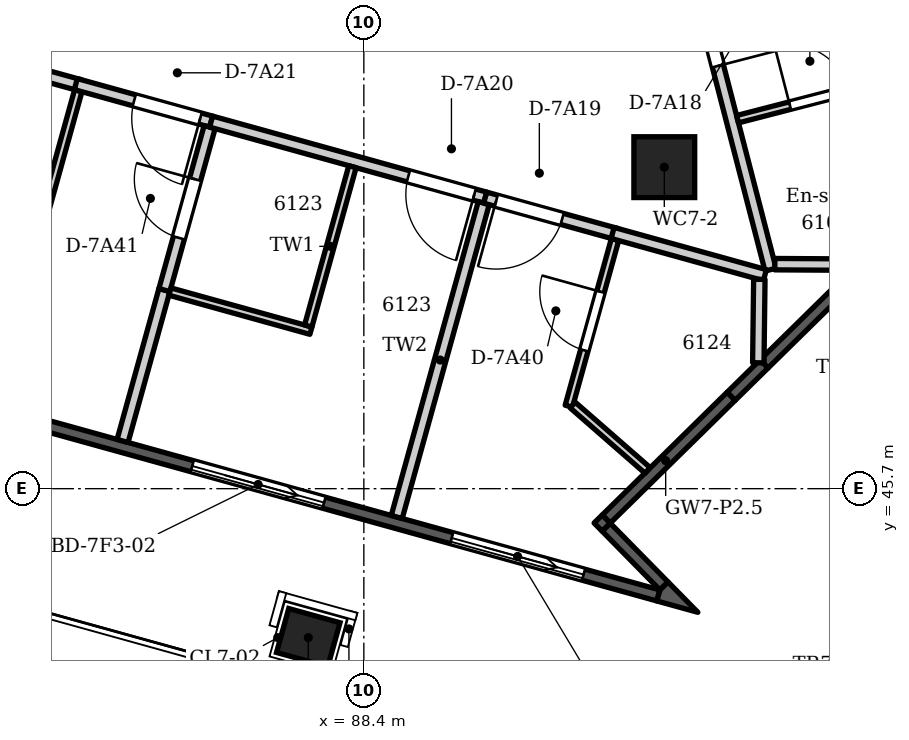
"""IFC4 building model, lengths in metres.
Left out: names, types, materials, properties, quantities, classifications, styles, units other than length and angle.
Written with IfcOpenShell. Run it as: python <this file> out.ifc"""

import sys

from ifc_helpers import new_model, si_unit, direction, frame, frame_2d, origin, origin_2d, place, context, subcontext, project, spatial, polyline, rectangle, circle, outline, extrude, element, fill, save


model = new_model("IFC4")
c1 = context("Model", 3, precision=1e-05, world=origin(), true_north=direction((0.0, 1.0)))
c2 = subcontext(c1, "Body", "Model", "MODEL_VIEW")
j1 = project(units=[si_unit("LENGTHUNIT", "METRE"), si_unit("PLANEANGLEUNIT", "RADIAN")], contexts=[c1])
p1 = place(None, origin())
s1 = spatial("IfcSite", under=j1, at=p1, CompositionType="ELEMENT")
p2 = place(p1, origin())
s2 = spatial("IfcBuilding", under=s1, at=p2, CompositionType="ELEMENT")
p3 = place(p2, frame((0.0, 0.0, 234.9)))
s3 = spatial("IfcBuildingStorey", under=s2, at=p3, CompositionType="ELEMENT", Elevation=234.9)
p4 = place(p3, frame((87.669, 43.741, -0.35), z_axis=(0.0, 0.0, 1.0), x_axis=(-0.963630453209, 0.267238376078, 0.0)))
e1 = element("IfcColumn", 1, at=p4, inside=s3, PredefinedType="COLUMN", context=c2, shape_type="SweptSolid", body=[
    extrude(rectangle(XDim=0.7, YDim=0.6, at=origin_2d()), origin(), (0.0, 0.0, 1.0), 3.95),
])
p5 = place(p3, frame((92.353, 49.93, -0.35), z_axis=(0.0, 0.0, 1.0), x_axis=(1.0, 0.0, 0.0)))
e2 = element("IfcColumn", 2, at=p5, inside=s3, PredefinedType="COLUMN", context=c2, shape_type="SweptSolid", body=[
    extrude(circle(Radius=0.4, at=origin_2d()), origin(), (0.0, 0.0, 1.0), 3.95),
])
p6 = place(p3, frame((89.591, 82.378, 0.0), z_axis=(0.0, 0.0, 1.0), x_axis=(0.250378839788, -0.968147941477, 0.0)))
e3 = element("IfcWall", 3, at=p6, inside=s3, PredefinedType="SOLIDWALL", context=c2, shape_type="SweptSolid", body=[
    extrude(outline(polyline([(0.149, 0.075), (0.149, -0.075), (33.537, -0.075), (33.537, 0.075), (0.149, 0.075)])), origin(), (0.0, 0.0, 1.0), 3.3),
])
p7 = place(p6, frame((1.171, 0.0, 0.0)))
e4 = element("IfcOpeningElement", 4, at=p7, cuts=e3, PredefinedType="OPENING", context=c2, shape_type="SweptSolid", body=[
    extrude(rectangle(XDim=1.8, YDim=2.6, at=frame_2d((0.9, 1.3))), frame((0.0, 0.085, 0.0), z_axis=(0.0, -1.0, 0.0), x_axis=(1.0, 0.0, 0.0)), (0.0, 0.0, 1.0), 0.17),
])
p8 = place(p6, frame((4.714, 0.0, 0.0)))
e5 = element("IfcOpeningElement", 5, at=p8, cuts=e3, PredefinedType="OPENING", context=c2, shape_type="SweptSolid", body=[
    extrude(rectangle(XDim=1.8, YDim=2.6, at=frame_2d((0.9, 1.3))), frame((0.0, 0.085, 0.0), z_axis=(0.0, -1.0, 0.0), x_axis=(1.0, 0.0, 0.0)), (0.0, 0.0, 1.0), 0.17),
])
p9 = place(p6, frame((8.457, 0.0, 0.0)))
e6 = element("IfcOpeningElement", 6, at=p9, cuts=e3, PredefinedType="OPENING", context=c2, shape_type="SweptSolid", body=[
    extrude(rectangle(XDim=1.8, YDim=2.6, at=frame_2d((0.9, 1.3))), frame((0.0, 0.085, 0.0), z_axis=(0.0, -1.0, 0.0), x_axis=(1.0, 0.0, 0.0)), (0.0, 0.0, 1.0), 0.17),
])
p10 = place(p6, frame((12.2, 0.0, 0.0)))
e7 = element("IfcOpeningElement", 7, at=p10, cuts=e3, PredefinedType="OPENING", context=c2, shape_type="SweptSolid", body=[
    extrude(rectangle(XDim=1.8, YDim=2.6, at=frame_2d((0.9, 1.3))), frame((0.0, 0.085, 0.0), z_axis=(0.0, -1.0, 0.0), x_axis=(1.0, 0.0, 0.0)), (0.0, 0.0, 1.0), 0.17),
])
p11 = place(p6, frame((15.943, 0.0, 0.0)))
e8 = element("IfcOpeningElement", 8, at=p11, cuts=e3, PredefinedType="OPENING", context=c2, shape_type="SweptSolid", body=[
    extrude(rectangle(XDim=1.8, YDim=2.6, at=frame_2d((0.9, 1.3))), frame((0.0, 0.085, 0.0), z_axis=(0.0, -1.0, 0.0), x_axis=(1.0, 0.0, 0.0)), (0.0, 0.0, 1.0), 0.17),
])
p12 = place(p6, frame((19.686, 0.0, 0.0)))
e9 = element("IfcOpeningElement", 9, at=p12, cuts=e3, PredefinedType="OPENING", context=c2, shape_type="SweptSolid", body=[
    extrude(rectangle(XDim=1.8, YDim=2.6, at=frame_2d((0.9, 1.3))), frame((0.0, 0.085, 0.0), z_axis=(0.0, -1.0, 0.0), x_axis=(1.0, 0.0, 0.0)), (0.0, 0.0, 1.0), 0.17),
])
p13 = place(p6, frame((23.429, 0.0, 0.0)))
e10 = element("IfcOpeningElement", 10, at=p13, cuts=e3, PredefinedType="OPENING", context=c2, shape_type="SweptSolid", body=[
    extrude(rectangle(XDim=1.8, YDim=2.6, at=frame_2d((0.9, 1.3))), frame((0.0, 0.085, 0.0), z_axis=(0.0, -1.0, 0.0), x_axis=(1.0, 0.0, 0.0)), (0.0, 0.0, 1.0), 0.17),
])
p14 = place(p6, frame((27.172, 0.0, 0.0)))
e11 = element("IfcOpeningElement", 11, at=p14, cuts=e3, PredefinedType="OPENING", context=c2, shape_type="SweptSolid", body=[
    extrude(rectangle(XDim=1.8, YDim=2.6, at=frame_2d((0.9, 1.3))), frame((0.0, 0.085, 0.0), z_axis=(0.0, -1.0, 0.0), x_axis=(1.0, 0.0, 0.0)), (0.0, 0.0, 1.0), 0.17),
])
p15 = place(p6, frame((30.715, 0.0, 0.0)))
e12 = element("IfcOpeningElement", 12, at=p15, cuts=e3, PredefinedType="OPENING", context=c2, shape_type="SweptSolid", body=[
    extrude(rectangle(XDim=1.8, YDim=2.6, at=frame_2d((0.9, 1.3))), frame((0.0, 0.085, 0.0), z_axis=(0.0, -1.0, 0.0), x_axis=(1.0, 0.0, 0.0)), (0.0, 0.0, 1.0), 0.17),
])
p16 = place(p3, frame((94.918, 48.573, 0.0), z_axis=(0.0, 0.0, 1.0), x_axis=(-0.713193839807, -0.700966865737, 0.0)))
e13 = element("IfcWall", 13, at=p16, inside=s3, PredefinedType="SOLIDWALL", context=c2, shape_type="SweptSolid", body=[
    extrude(outline(polyline([(0.0, -0.075), (1.757, -0.075), (1.757, 0.075), (0.0, 0.075), (0.0, -0.075)])), origin(), (0.0, 0.0, 1.0), 3.3),
])
p17 = place(p3, frame((93.665, 47.341, 0.0), z_axis=(0.0, 0.0, 1.0), x_axis=(-0.713304727682, -0.700854025791, 0.0)))
e14 = element("IfcWall", 14, at=p17, inside=s3, PredefinedType="SOLIDWALL", context=c2, shape_type="SweptSolid", body=[
    extrude(outline(polyline([(0.0, -0.075), (0.608, -0.075), (0.608, 0.075), (0.0, 0.075), (0.0, -0.075)])), origin(), (0.0, 0.0, 1.0), 2.75),
])
p18 = place(p3, frame((93.232, 46.915, 0.0), z_axis=(0.0, 0.0, 1.0), x_axis=(-0.713249493487, -0.700910236793, 0.0)))
e15 = element("IfcWall", 15, at=p18, inside=s3, PredefinedType="SOLIDWALL", context=c2, shape_type="SweptSolid", body=[
    extrude(outline(polyline([(2.304, 0.075), (0.0, 0.075), (0.0, -0.075), (2.304, -0.075), (2.304, 0.075)])), origin(), (0.0, 0.0, 1.0), 3.3),
])
p19 = place(p3, frame((91.51, 45.272, 0.0), z_axis=(0.0, 0.0, 1.0), x_axis=(0.700999978355, -0.71316129336, 0.0)))
e16 = element("IfcWall", 16, at=p19, inside=s3, PredefinedType="SOLIDWALL", context=c2, shape_type="SweptSolid", body=[
    extrude(outline(polyline([(0.11, 0.075), (0.11, -0.075), (1.196, -0.075), (1.196, 0.075), (0.11, 0.075)])), origin(), (0.0, 0.0, 1.0), 3.3),
])
p20 = place(p3, frame((92.419, 44.255, 0.0), z_axis=(0.0, 0.0, 1.0), x_axis=(-0.963630586427, 0.267237895708, 0.0)))
e17 = element("IfcWall", 17, at=p20, inside=s3, PredefinedType="SOLIDWALL", context=c2, shape_type="SweptSolid", body=[
    extrude(outline(polyline([(0.149, 0.075), (0.149, -0.075), (33.537, -0.075), (33.537, 0.075), (0.149, 0.075)])), origin(), (0.0, 0.0, 1.0), 3.3),
])
p21 = place(p20, frame((1.171, 0.0, 0.0)))
e18 = element("IfcOpeningElement", 18, at=p21, cuts=e17, PredefinedType="OPENING", context=c2, shape_type="SweptSolid", body=[
    extrude(rectangle(XDim=1.8, YDim=2.6, at=frame_2d((0.9, 1.3))), frame((0.0, 0.085, 0.0), z_axis=(0.0, -1.0, 0.0), x_axis=(1.0, 0.0, 0.0)), (0.0, 0.0, 1.0), 0.17),
])
p22 = place(p20, frame((4.714, 0.0, 0.0)))
e19 = element("IfcOpeningElement", 19, at=p22, cuts=e17, PredefinedType="OPENING", context=c2, shape_type="SweptSolid", body=[
    extrude(rectangle(XDim=1.8, YDim=2.6, at=frame_2d((0.9, 1.3))), frame((0.0, 0.085, 0.0), z_axis=(0.0, -1.0, 0.0), x_axis=(1.0, 0.0, 0.0)), (0.0, 0.0, 1.0), 0.17),
])
p23 = place(p20, frame((8.457, 0.0, 0.0)))
e20 = element("IfcOpeningElement", 20, at=p23, cuts=e17, PredefinedType="OPENING", context=c2, shape_type="SweptSolid", body=[
    extrude(rectangle(XDim=1.8, YDim=2.6, at=frame_2d((0.9, 1.3))), frame((0.0, 0.085, 0.0), z_axis=(0.0, -1.0, 0.0), x_axis=(1.0, 0.0, 0.0)), (0.0, 0.0, 1.0), 0.17),
])
p24 = place(p20, frame((12.2, 0.0, 0.0)))
e21 = element("IfcOpeningElement", 21, at=p24, cuts=e17, PredefinedType="OPENING", context=c2, shape_type="SweptSolid", body=[
    extrude(rectangle(XDim=1.8, YDim=2.6, at=frame_2d((0.9, 1.3))), frame((0.0, 0.085, 0.0), z_axis=(0.0, -1.0, 0.0), x_axis=(1.0, 0.0, 0.0)), (0.0, 0.0, 1.0), 0.17),
])
p25 = place(p20, frame((15.943, 0.0, 0.0)))
e22 = element("IfcOpeningElement", 22, at=p25, cuts=e17, PredefinedType="OPENING", context=c2, shape_type="SweptSolid", body=[
    extrude(rectangle(XDim=1.8, YDim=2.6, at=frame_2d((0.9, 1.3))), frame((0.0, 0.085, 0.0), z_axis=(0.0, -1.0, 0.0), x_axis=(1.0, 0.0, 0.0)), (0.0, 0.0, 1.0), 0.17),
])
p26 = place(p20, frame((19.686, 0.0, 0.0)))
e23 = element("IfcOpeningElement", 23, at=p26, cuts=e17, PredefinedType="OPENING", context=c2, shape_type="SweptSolid", body=[
    extrude(rectangle(XDim=1.8, YDim=2.6, at=frame_2d((0.9, 1.3))), frame((0.0, 0.085, 0.0), z_axis=(0.0, -1.0, 0.0), x_axis=(1.0, 0.0, 0.0)), (0.0, 0.0, 1.0), 0.17),
])
p27 = place(p20, frame((23.429, 0.0, 0.0)))
e24 = element("IfcOpeningElement", 24, at=p27, cuts=e17, PredefinedType="OPENING", context=c2, shape_type="SweptSolid", body=[
    extrude(rectangle(XDim=1.8, YDim=2.6, at=frame_2d((0.9, 1.3))), frame((0.0, 0.085, 0.0), z_axis=(0.0, -1.0, 0.0), x_axis=(1.0, 0.0, 0.0)), (0.0, 0.0, 1.0), 0.17),
])
p28 = place(p20, frame((27.172, 0.0, 0.0)))
e25 = element("IfcOpeningElement", 25, at=p28, cuts=e17, PredefinedType="OPENING", context=c2, shape_type="SweptSolid", body=[
    extrude(rectangle(XDim=1.8, YDim=2.6, at=frame_2d((0.9, 1.3))), frame((0.0, 0.085, 0.0), z_axis=(0.0, -1.0, 0.0), x_axis=(1.0, 0.0, 0.0)), (0.0, 0.0, 1.0), 0.17),
])
p29 = place(p20, frame((30.715, 0.0, 0.0)))
e26 = element("IfcOpeningElement", 26, at=p29, cuts=e17, PredefinedType="OPENING", context=c2, shape_type="SweptSolid", body=[
    extrude(rectangle(XDim=1.8, YDim=2.6, at=frame_2d((0.9, 1.3))), frame((0.0, 0.085, 0.0), z_axis=(0.0, -1.0, 0.0), x_axis=(1.0, 0.0, 0.0)), (0.0, 0.0, 1.0), 0.17),
])
p30 = place(p3, origin())
e27 = element("IfcWall", 27, at=p30, inside=s3, PredefinedType="PARAPET", context=c2, shape_type="SweptSolid", body=[
    extrude(outline(polyline([(59.388, 50.961), (96.326, 36.411), (96.275, 36.753), (62.154, 50.194), (59.388, 50.961)])), origin(), (0.0, 0.0, 1.0), 1.1),
])
p31 = place(p3, origin())
e28 = element("IfcWall", 28, at=p31, inside=s3, PredefinedType="PARAPET", context=c2, shape_type="SweptSolid", body=[
    extrude(outline(polyline([(100.299, 50.419), (94.431, 89.683), (94.16, 89.468), (99.581, 53.198), (100.299, 50.419)])), origin(), (0.0, 0.0, 1.0), 1.1),
])
p32 = place(p3, frame((82.852, 51.508, 0.0), z_axis=(0.0, 0.0, 1.0), x_axis=(0.963942160186, -0.266111840805, 0.0)))
e29 = element("IfcWall", 29, at=p32, inside=s3, PredefinedType="PARTITIONING", context=c2, shape_type="SweptSolid", body=[
    extrude(rectangle(XDim=1.883, YDim=0.15, at=frame_2d((0.941, 0.0))), origin(), (0.0, 0.0, 1.0), 3.3),
])
p33 = place(p3, frame((83.507, 51.396, 0.0), z_axis=(0.0, 0.0, 1.0), x_axis=(0.712824796749, 0.701342148412, 0.0)))
e30 = element("IfcWall", 30, at=p33, inside=s3, PredefinedType="PARTITIONING", context=c2, shape_type="SweptSolid", body=[
    extrude(rectangle(XDim=2.169, YDim=0.15, at=frame_2d((1.084, 0.0))), origin(), (0.0, 0.0, 1.0), 3.3),
])
p34 = place(p3, frame((84.061, 48.84, 0.0), z_axis=(0.0, 0.0, 1.0), x_axis=(0.26738911175, 0.96358863781, 0.0)))
e31 = element("IfcWall", 31, at=p34, inside=s3, PredefinedType="PARTITIONING", context=c2, shape_type="SweptSolid", body=[
    extrude(rectangle(XDim=2.175, YDim=0.1, at=frame_2d((1.087, 0.0))), origin(), (0.0, 0.0, 1.0), 3.3),
])
p35 = place(p3, frame((84.611, 51.022, 0.0), z_axis=(0.0, 0.0, 1.0), x_axis=(0.963673001046, -0.267084906077, 0.0)))
e32 = element("IfcWall", 32, at=p35, inside=s3, PredefinedType="PARTITIONING", context=c2, shape_type="SweptSolid", body=[
    extrude(rectangle(XDim=1.847, YDim=0.15, at=frame_2d((0.924, 0.0))), origin(), (0.0, 0.0, 1.0), 3.3),
])
p36 = place(p35, frame((0.797, 0.0, 0.0)))
e33 = element("IfcOpeningElement", 33, at=p36, cuts=e32, PredefinedType="OPENING", context=c2, shape_type="SweptSolid", body=[
    extrude(rectangle(XDim=0.9, YDim=2.1, at=frame_2d((0.45, 1.05))), frame((0.0, 0.085, 0.0), z_axis=(0.0, -1.0, 0.0), x_axis=(1.0, 0.0, 0.0)), (0.0, 0.0, 1.0), 0.17),
])
p37 = place(p3, frame((85.226, 46.327, 0.0), z_axis=(0.0, 0.0, 1.0), x_axis=(0.267075474737, 0.963675614921, 0.0)))
e34 = element("IfcWall", 34, at=p37, inside=s3, PredefinedType="PARTITIONING", context=c2, shape_type="SweptSolid", body=[
    extrude(rectangle(XDim=2.061, YDim=0.15, at=frame_2d((1.03, 0.0))), origin(), (0.0, 0.0, 1.0), 3.3),
])
p38 = place(p3, frame((85.776, 48.313, 0.0), z_axis=(0.0, 0.0, 1.0), x_axis=(0.267423129935, 0.963579197355, 0.0)))
e35 = element("IfcWall", 35, at=p38, inside=s3, PredefinedType="PARTITIONING", context=c2, shape_type="SweptSolid", body=[
    extrude(rectangle(XDim=2.225, YDim=0.15, at=frame_2d((1.112, 0.0))), origin(), (0.0, 0.0, 1.0), 3.3),
])
p39 = place(p38, frame((0.712, 0.0, 0.0)))
e36 = element("IfcOpeningElement", 36, at=p39, cuts=e35, PredefinedType="OPENING", context=c2, shape_type="SweptSolid", body=[
    extrude(rectangle(XDim=0.8, YDim=2.1, at=frame_2d((0.4, 1.05))), frame((0.0, 0.085, 0.0), z_axis=(0.0, -1.0, 0.0), x_axis=(1.0, 0.0, 0.0)), (0.0, 0.0, 1.0), 0.17),
])
p40 = place(p3, frame((85.848, 48.293, 0.0), z_axis=(0.0, 0.0, 1.0), x_axis=(0.963625049046, -0.267257862095, 0.0)))
e37 = element("IfcWall", 37, at=p40, inside=s3, PredefinedType="PARTITIONING", context=c2, shape_type="SweptSolid", body=[
    extrude(rectangle(XDim=1.925, YDim=0.1, at=frame_2d((0.962, 0.0))), origin(), (0.0, 0.0, 1.0), 3.3),
])
p41 = place(p3, frame((86.391, 50.529, 0.0), z_axis=(0.0, 0.0, 1.0), x_axis=(0.963631856359, -0.267233316428, 0.0)))
e38 = element("IfcWall", 38, at=p41, inside=s3, PredefinedType="PARTITIONING", context=c2, shape_type="SweptSolid", body=[
    extrude(rectangle(XDim=3.742, YDim=0.15, at=frame_2d((1.871, 0.0))), origin(), (0.0, 0.0, 1.0), 3.3),
])
p42 = place(p41, frame((2.692, 0.0, 0.0)))
e39 = element("IfcOpeningElement", 39, at=p42, cuts=e38, PredefinedType="OPENING", context=c2, shape_type="SweptSolid", body=[
    extrude(rectangle(XDim=0.9, YDim=2.1, at=frame_2d((0.45, 1.05))), frame((0.0, 0.085, 0.0), z_axis=(0.0, -1.0, 0.0), x_axis=(1.0, 0.0, 0.0)), (0.0, 0.0, 1.0), 0.17),
])
p43 = place(p3, frame((87.668, 47.84, 0.0), z_axis=(0.0, 0.0, 1.0), x_axis=(0.26738911175, 0.96358863781, 0.0)))
e40 = element("IfcWall", 40, at=p43, inside=s3, PredefinedType="PARTITIONING", context=c2, shape_type="SweptSolid", body=[
    extrude(rectangle(XDim=2.175, YDim=0.1, at=frame_2d((1.087, 0.0))), origin(), (0.0, 0.0, 1.0), 3.3),
])
p44 = place(p3, frame((88.833, 45.327, 0.0), z_axis=(0.0, 0.0, 1.0), x_axis=(0.267044344438, 0.963684241909, 0.0)))
e41 = element("IfcWall", 41, at=p44, inside=s3, PredefinedType="PARTITIONING", context=c2, shape_type="SweptSolid", body=[
    extrude(rectangle(XDim=4.285, YDim=0.15, at=frame_2d((2.143, 0.0))), origin(), (0.0, 0.0, 1.0), 3.3),
])
p45 = place(p3, frame((89.997, 49.529, 0.0), z_axis=(0.0, 0.0, 1.0), x_axis=(0.963677325853, -0.267069301188, 0.0)))
e42 = element("IfcWall", 42, at=p45, inside=s3, PredefinedType="PARTITIONING", context=c2, shape_type="SweptSolid", body=[
    extrude(rectangle(XDim=1.797, YDim=0.15, at=frame_2d((0.898, 0.0))), origin(), (0.0, 0.0, 1.0), 3.3),
])
p46 = place(p45, frame((0.15, 0.0, 0.0)))
e43 = element("IfcOpeningElement", 43, at=p46, cuts=e42, PredefinedType="OPENING", context=c2, shape_type="SweptSolid", body=[
    extrude(rectangle(XDim=0.9, YDim=2.1, at=frame_2d((0.45, 1.05))), frame((0.0, 0.085, 0.0), z_axis=(0.0, -1.0, 0.0), x_axis=(1.0, 0.0, 0.0)), (0.0, 0.0, 1.0), 0.17),
])
p47 = place(p3, frame((91.097, 46.785, 0.0), z_axis=(0.0, 0.0, 1.0), x_axis=(0.267345061669, 0.963600860316, 0.0)))
e44 = element("IfcWall", 44, at=p47, inside=s3, PredefinedType="PARTITIONING", context=c2, shape_type="SweptSolid", body=[
    extrude(rectangle(XDim=2.276, YDim=0.1, at=frame_2d((1.138, 0.0))), origin(), (0.0, 0.0, 1.0), 3.3),
])
p48 = place(p47, frame((0.763, 0.0, 0.0)))
e45 = element("IfcOpeningElement", 45, at=p48, cuts=e44, PredefinedType="OPENING", context=c2, shape_type="SweptSolid", body=[
    extrude(rectangle(XDim=0.8, YDim=2.1, at=frame_2d((0.4, 1.05))), frame((0.0, 0.06, 0.0), z_axis=(0.0, -1.0, 0.0), x_axis=(1.0, 0.0, 0.0)), (0.0, 0.0, 1.0), 0.12),
])
p49 = place(p3, frame((91.148, 46.8, 0.0), z_axis=(0.0, 0.0, 1.0), x_axis=(0.753374202667, -0.657592054967, 0.0)))
e46 = element("IfcWall", 46, at=p49, inside=s3, PredefinedType="PARTITIONING", context=c2, shape_type="SweptSolid", body=[
    extrude(rectangle(XDim=1.308, YDim=0.1, at=frame_2d((0.654, 0.0))), origin(), (0.0, 0.0, 1.0), 3.3),
])
p50 = place(p3, frame((91.355, 57.841, 0.0), z_axis=(0.0, 0.0, 1.0), x_axis=(0.25042530879, -0.968135922646, 0.0)))
e47 = element("IfcWall", 47, at=p50, inside=s3, PredefinedType="PARTITIONING", context=c2, shape_type="SweptSolid", body=[
    extrude(rectangle(XDim=9.565, YDim=0.15, at=frame_2d((4.782, 0.0))), origin(), (0.0, 0.0, 1.0), 2.75),
])
p51 = place(p50, frame((4.697, 0.0, 0.0)))
e48 = element("IfcOpeningElement", 48, at=p51, cuts=e47, PredefinedType="OPENING", context=c2, shape_type="SweptSolid", body=[
    extrude(rectangle(XDim=0.9, YDim=2.1, at=frame_2d((0.45, 1.05))), frame((0.0, 0.085, 0.0), z_axis=(0.0, -1.0, 0.0), x_axis=(1.0, 0.0, 0.0)), (0.0, 0.0, 1.0), 0.17),
])
p52 = place(p50, frame((5.897, 0.0, 0.0)))
e49 = element("IfcOpeningElement", 49, at=p52, cuts=e47, PredefinedType="OPENING", context=c2, shape_type="SweptSolid", body=[
    extrude(rectangle(XDim=0.9, YDim=2.1, at=frame_2d((0.45, 1.05))), frame((0.0, 0.085, 0.0), z_axis=(0.0, -1.0, 0.0), x_axis=(1.0, 0.0, 0.0)), (0.0, 0.0, 1.0), 0.17),
])
p53 = place(p3, frame((91.673, 49.064, 0.0), z_axis=(0.0, 0.0, 1.0), x_axis=(0.963652381101, -0.267159294054, 0.0)))
e50 = element("IfcWall", 50, at=p53, inside=s3, PredefinedType="PARTITIONING", context=c2, shape_type="SweptSolid", body=[
    extrude(rectangle(XDim=2.079, YDim=0.15, at=frame_2d((1.04, 0.0))), origin(), (0.0, 0.0, 1.0), 2.75),
])
p54 = place(p3, frame((93.317, 50.561, 0.0), z_axis=(0.0, 0.0, 1.0), x_axis=(0.968101130966, 0.25055977375, 0.0)))
e51 = element("IfcWall", 51, at=p54, inside=s3, PredefinedType="PARTITIONING", context=c2, shape_type="SweptSolid", body=[
    extrude(rectangle(XDim=2.274, YDim=0.1, at=frame_2d((1.137, 0.0))), origin(), (0.0, 0.0, 1.0), 3.3),
])
p55 = place(p54, frame((0.712, 0.0, 0.0)))
e52 = element("IfcOpeningElement", 52, at=p55, cuts=e51, PredefinedType="OPENING", context=c2, shape_type="SweptSolid", body=[
    extrude(rectangle(XDim=0.8, YDim=2.1, at=frame_2d((0.4, 1.05))), frame((0.0, 0.06, 0.0), z_axis=(0.0, -1.0, 0.0), x_axis=(1.0, 0.0, 0.0)), (0.0, 0.0, 1.0), 0.12),
])
for number, where, z_axis, x_axis in (
    (53, (93.59, 47.356, 0.0), (0.0, 0.0, 1.0), (0.012, 1.0, 0.0)),
    (54, (93.807, 48.654, 0.0), (0.0, 0.0, 1.0), (1.0, -0.006, 0.0)),
):
    element("IfcWall", number, at=place(p3, frame(where, z_axis=z_axis, x_axis=x_axis)), inside=s3, PredefinedType="PARTITIONING", context=c2, shape_type="SweptSolid", body=[
        extrude(rectangle(XDim=1.098, YDim=0.15, at=frame_2d((0.549, 0.0))), origin(), (0.0, 0.0, 1.0), 2.75),
    ])
p56 = place(p21, origin())
e55 = element("IfcDoor", 55, at=p56, inside=s3, OperationType="SLIDING_TO_LEFT", PredefinedType="DOOR", context=c2, shape_type="SweptSolid", body=[
    extrude(rectangle(XDim=1.8, YDim=2.6, at=frame_2d((0.9, 1.3))), frame((0.0, 0.025, 0.0), z_axis=(0.0, -1.0, 0.0), x_axis=(1.0, 0.0, 0.0)), (0.0, 0.0, 1.0), 0.05),
])
fill(e18, e55)
p57 = place(p22, origin())
e56 = element("IfcDoor", 56, at=p57, inside=s3, OperationType="SLIDING_TO_LEFT", PredefinedType="DOOR", context=c2, shape_type="SweptSolid", body=[
    extrude(rectangle(XDim=1.8, YDim=2.6, at=frame_2d((0.9, 1.3))), frame((0.0, 0.025, 0.0), z_axis=(0.0, -1.0, 0.0), x_axis=(1.0, 0.0, 0.0)), (0.0, 0.0, 1.0), 0.05),
])
fill(e19, e56)
p58 = place(p52, origin())
e57 = element("IfcDoor", 57, at=p58, inside=s3, OperationType="SINGLE_SWING_RIGHT", PredefinedType="DOOR", context=c2, shape_type="SweptSolid", body=[
    extrude(rectangle(XDim=0.9, YDim=2.1, at=frame_2d((0.45, 1.05))), frame((0.0, 0.025, 0.0), z_axis=(0.0, -1.0, 0.0), x_axis=(1.0, 0.0, 0.0)), (0.0, 0.0, 1.0), 0.05),
])
fill(e49, e57)
p59 = place(p46, frame((0.9, 0.0, 0.0), z_axis=(0.0, 0.0, 1.0), x_axis=(-1.0, 0.0, 0.0)))
e58 = element("IfcDoor", 58, at=p59, inside=s3, OperationType="SINGLE_SWING_RIGHT", PredefinedType="DOOR", context=c2, shape_type="SweptSolid", body=[
    extrude(rectangle(XDim=0.9, YDim=2.1, at=frame_2d((0.45, 1.05))), frame((0.0, 0.025, 0.0), z_axis=(0.0, -1.0, 0.0), x_axis=(1.0, 0.0, 0.0)), (0.0, 0.0, 1.0), 0.05),
])
fill(e43, e58)
p60 = place(p42, frame((0.9, 0.0, 0.0), z_axis=(0.0, 0.0, 1.0), x_axis=(-1.0, 0.0, 0.0)))
e59 = element("IfcDoor", 59, at=p60, inside=s3, OperationType="SINGLE_SWING_LEFT", PredefinedType="DOOR", context=c2, shape_type="SweptSolid", body=[
    extrude(rectangle(XDim=0.9, YDim=2.1, at=frame_2d((0.45, 1.05))), frame((0.0, 0.025, 0.0), z_axis=(0.0, -1.0, 0.0), x_axis=(1.0, 0.0, 0.0)), (0.0, 0.0, 1.0), 0.05),
])
fill(e39, e59)
p61 = place(p36, frame((0.9, 0.0, 0.0), z_axis=(0.0, 0.0, 1.0), x_axis=(-1.0, 0.0, 0.0)))
e60 = element("IfcDoor", 60, at=p61, inside=s3, OperationType="SINGLE_SWING_LEFT", PredefinedType="DOOR", context=c2, shape_type="SweptSolid", body=[
    extrude(rectangle(XDim=0.9, YDim=2.1, at=frame_2d((0.45, 1.05))), frame((0.0, 0.025, 0.0), z_axis=(0.0, -1.0, 0.0), x_axis=(1.0, 0.0, 0.0)), (0.0, 0.0, 1.0), 0.05),
])
fill(e33, e60)
p62 = place(p55, origin())
e61 = element("IfcDoor", 61, at=p62, inside=s3, OperationType="SINGLE_SWING_LEFT", PredefinedType="DOOR", context=c2, shape_type="SweptSolid", body=[
    extrude(rectangle(XDim=0.8, YDim=2.1, at=frame_2d((0.4, 1.05))), frame((0.0, 0.025, 0.0), z_axis=(0.0, -1.0, 0.0), x_axis=(1.0, 0.0, 0.0)), (0.0, 0.0, 1.0), 0.05),
])
fill(e52, e61)
p63 = place(p48, origin())
e62 = element("IfcDoor", 62, at=p63, inside=s3, OperationType="SINGLE_SWING_RIGHT", PredefinedType="DOOR", context=c2, shape_type="SweptSolid", body=[
    extrude(rectangle(XDim=0.8, YDim=2.1, at=frame_2d((0.4, 1.05))), frame((0.0, 0.025, 0.0), z_axis=(0.0, -1.0, 0.0), x_axis=(1.0, 0.0, 0.0)), (0.0, 0.0, 1.0), 0.05),
])
fill(e45, e62)
p64 = place(p39, origin())
e63 = element("IfcDoor", 63, at=p64, inside=s3, OperationType="SINGLE_SWING_RIGHT", PredefinedType="DOOR", context=c2, shape_type="SweptSolid", body=[
    extrude(rectangle(XDim=0.8, YDim=2.1, at=frame_2d((0.4, 1.05))), frame((0.0, 0.025, 0.0), z_axis=(0.0, -1.0, 0.0), x_axis=(1.0, 0.0, 0.0)), (0.0, 0.0, 1.0), 0.05),
])
fill(e36, e63)
save(model, sys.argv[1])
